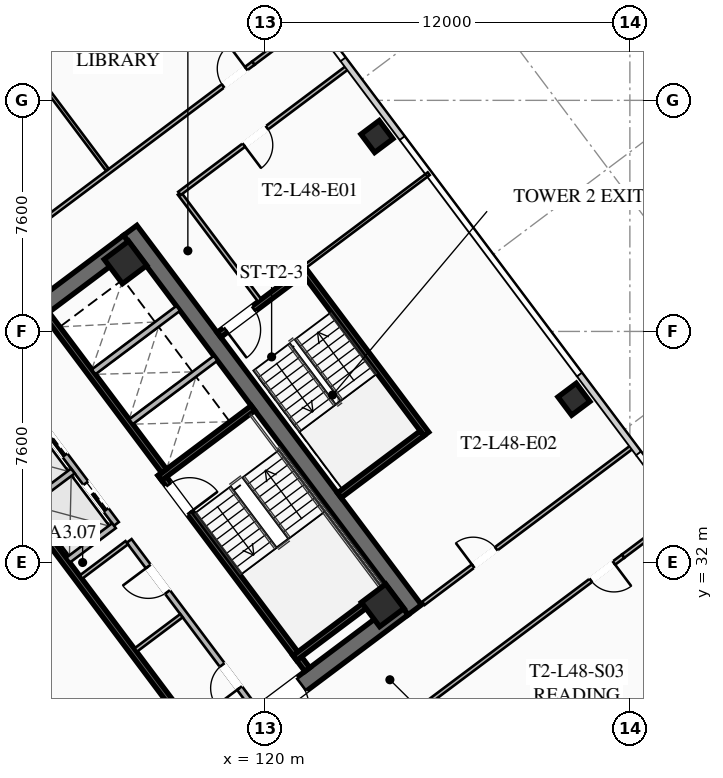
"""IFC4 building model, lengths in metres.
Left out: names, types, materials, properties, quantities, classifications, styles, units other than length and angle.
Written with IfcOpenShell. Run it as: python <this file> out.ifc"""

import sys

from ifc_helpers import new_model, si_unit, direction, frame, frame_2d, origin, origin_2d, place, context, subcontext, project, spatial, rectangle, hollow_rectangle, extrude, element, fill, save


model = new_model("IFC4")
c1 = context("Model", 3, precision=1e-05, world=origin(), true_north=direction((0.0, 1.0)))
c2 = subcontext(c1, "Body", "Model", "MODEL_VIEW")
j1 = project(units=[si_unit("LENGTHUNIT", "METRE"), si_unit("PLANEANGLEUNIT", "RADIAN")], contexts=[c1])
p1 = place(None, origin())
s1 = spatial("IfcSite", under=j1, at=p1, CompositionType="ELEMENT")
p2 = place(p1, origin())
s2 = spatial("IfcBuilding", under=s1, at=p2, CompositionType="ELEMENT")
p3 = place(p2, frame((0.0, 0.0, 178.3)))
s3 = spatial("IfcBuildingStorey", under=s2, at=p3, CompositionType="ELEMENT", Elevation=178.3)
p4 = place(p3, frame((115.564, 42.923, 0.0), z_axis=(0.0, 0.0, 1.0), x_axis=(0.600005007985, -0.799996243986, 0.0)))
e1 = element("IfcWall", 1, at=p4, inside=s3, PredefinedType="SHEAR", context=c2, shape_type="SweptSolid", body=[
    extrude(rectangle(XDim=15.6, YDim=0.55, at=frame_2d((7.8, 0.0))), origin(), (0.0, 0.0, 1.0), 3.55),
])
p5 = place(p3, frame((124.539, 30.498, 0.0), z_axis=(0.0, 0.0, 1.0), x_axis=(-0.799998054672, -0.600002593761, 0.0)))
e2 = element("IfcWall", 2, at=p5, inside=s3, PredefinedType="SHEAR", context=c2, shape_type="SweptSolid", body=[
    extrude(rectangle(XDim=15.06, YDim=0.55, at=frame_2d((7.53, 0.0))), origin(), (0.0, 0.0, 1.0), 3.55),
])
p6 = place(p5, frame((9.23, 0.0, 0.0)))
e3 = element("IfcOpeningElement", 3, at=p6, cuts=e2, PredefinedType="OPENING", context=c2, shape_type="SweptSolid", body=[
    extrude(rectangle(XDim=1.25, YDim=2.25, at=frame_2d((0.625, 1.125))), frame((0.0, 0.285, 0.0), z_axis=(0.0, -1.0, 0.0), x_axis=(1.0, 0.0, 0.0)), (0.0, 0.0, 1.0), 0.57),
])
p7 = place(p5, frame((4.18, 0.0, 0.0)))
e4 = element("IfcOpeningElement", 4, at=p7, cuts=e2, PredefinedType="OPENING", context=c2, shape_type="SweptSolid", body=[
    extrude(rectangle(XDim=1.25, YDim=2.25, at=frame_2d((0.625, 1.125))), frame((0.0, 0.285, 0.0), z_axis=(0.0, -1.0, 0.0), x_axis=(1.0, 0.0, 0.0)), (0.0, 0.0, 1.0), 0.57),
])
p8 = place(p3, frame((103.461, 33.502, 0.0), z_axis=(0.0, 0.0, 1.0), x_axis=(0.799998054672, 0.600002593761, 0.0)))
e5 = element("IfcWall", 5, at=p8, inside=s3, PredefinedType="SHEAR", context=c2, shape_type="SweptSolid", body=[
    extrude(rectangle(XDim=15.06, YDim=0.55, at=frame_2d((7.53, 0.0))), origin(), (0.0, 0.0, 1.0), 3.55),
])
p9 = place(p8, frame((4.58, 0.0, 0.0)))
e6 = element("IfcOpeningElement", 6, at=p9, cuts=e5, PredefinedType="OPENING", context=c2, shape_type="SweptSolid", body=[
    extrude(rectangle(XDim=1.25, YDim=2.25, at=frame_2d((0.625, 1.125))), frame((0.0, 0.285, 0.0), z_axis=(0.0, -1.0, 0.0), x_axis=(1.0, 0.0, 0.0)), (0.0, 0.0, 1.0), 0.57),
])
p10 = place(p8, frame((9.63, 0.0, 0.0)))
e7 = element("IfcOpeningElement", 7, at=p10, cuts=e5, PredefinedType="OPENING", context=c2, shape_type="SweptSolid", body=[
    extrude(rectangle(XDim=1.25, YDim=2.25, at=frame_2d((0.625, 1.125))), frame((0.0, 0.285, 0.0), z_axis=(0.0, -1.0, 0.0), x_axis=(1.0, 0.0, 0.0)), (0.0, 0.0, 1.0), 0.57),
])
for number, where, z_axis, x_axis in (
    (8, (123.87, 30.59, 0.0), (0.0, 0.0, 1.0), (0.8, 0.6, 0.0)),
    (9, (115.41, 41.87, 0.0), (0.0, 0.0, 1.0), (0.8, 0.6, 0.0)),
):
    element("IfcColumn", number, at=place(p3, frame(where, z_axis=z_axis, x_axis=x_axis)), inside=s3, PredefinedType="COLUMN", context=c2, shape_type="SweptSolid", body=[
        extrude(hollow_rectangle(XDim=1.0, YDim=1.0, WallThickness=0.04, at=origin_2d()), origin(), (0.0, 0.0, 1.0), 3.37),
    ])
for number, where, z_axis, x_axis in (
    (10, (130.16, 37.37, 0.0), (0.0, 0.0, 1.0), (0.8, 0.6, 0.0)),
    (11, (123.68, 46.01, 0.0), (0.0, 0.0, 1.0), (0.8, 0.6, 0.0)),
):
    element("IfcColumn", number, at=place(p3, frame(where, z_axis=z_axis, x_axis=x_axis)), inside=s3, PredefinedType="COLUMN", context=c2, shape_type="SweptSolid", body=[
        extrude(hollow_rectangle(XDim=0.75, YDim=0.75, WallThickness=0.032, at=origin_2d()), origin(), (0.0, 0.0, 1.0), 3.37),
    ])
p11 = place(p3, frame((116.56, 34.92, 0.0), z_axis=(0.0, 0.0, 1.0), x_axis=(0.59999029481, -0.8000072788, 0.0)))
e12 = element("IfcWall", 12, at=p11, inside=s3, PredefinedType="SHEAR", context=c2, shape_type="SweptSolid", body=[
    extrude(rectangle(XDim=8.05, YDim=0.2, at=frame_2d((4.025, 0.0))), origin(), (0.0, 0.0, 1.0), 3.37),
])
p12 = place(p11, frame((0.45, 0.0, 0.0)))
e13 = element("IfcOpeningElement", 13, at=p12, cuts=e12, PredefinedType="OPENING", context=c2, shape_type="SweptSolid", body=[
    extrude(rectangle(XDim=1.15, YDim=2.2, at=frame_2d((0.575, 1.1))), frame((0.0, 0.11, 0.0), z_axis=(0.0, -1.0, 0.0), x_axis=(1.0, 0.0, 0.0)), (0.0, 0.0, 1.0), 0.22),
])
for number, where, z_axis, x_axis in (
    (14, (116.54, 34.78, 0.0), (0.0, 0.0, 1.0), (0.8, 0.6, 0.0)),
    (15, (120.98, 28.86, 0.0), (0.0, 0.0, 1.0), (0.8, 0.6, 0.0)),
):
    element("IfcWall", number, at=place(p3, frame(where, z_axis=z_axis, x_axis=x_axis)), inside=s3, PredefinedType="SHEAR", context=c2, shape_type="SweptSolid", body=[
        extrude(rectangle(XDim=3.83, YDim=0.2, at=frame_2d((1.915, 0.0))), origin(), (0.0, 0.0, 1.0), 3.37),
    ])
p13 = place(p3, frame((117.998, 25.936, 0.0), z_axis=(0.0, 0.0, 1.0), x_axis=(-0.600002693989, 0.799997979501, 0.0)))
e16 = element("IfcWall", 16, at=p13, inside=s3, PredefinedType="SHEAR", context=c2, shape_type="SweptSolid", body=[
    extrude(rectangle(XDim=14.5, YDim=0.2, at=frame_2d((7.25, 0.0))), origin(), (0.0, 0.0, 1.0), 3.37),
])
p14 = place(p3, frame((115.19, 23.83, 0.0), z_axis=(0.0, 0.0, 1.0), x_axis=(-0.599993943644, 0.800004542231, 0.0)))
e17 = element("IfcWall", 17, at=p14, inside=s3, PredefinedType="SHEAR", context=c2, shape_type="SweptSolid", body=[
    extrude(rectangle(XDim=6.45, YDim=0.2, at=frame_2d((3.225, 0.0))), origin(), (0.0, 0.0, 1.0), 3.37),
])
p15 = place(p14, frame((4.875, 0.0, 0.0)))
e18 = element("IfcOpeningElement", 18, at=p15, cuts=e17, PredefinedType="OPENING", context=c2, shape_type="SweptSolid", body=[
    extrude(rectangle(XDim=1.3, YDim=2.25, at=frame_2d((0.65, 1.125))), frame((0.0, 0.11, 0.0), z_axis=(0.0, -1.0, 0.0), x_axis=(1.0, 0.0, 0.0)), (0.0, 0.0, 1.0), 0.22),
])
p16 = place(p14, frame((2.875, 0.0, 0.0)))
e19 = element("IfcOpeningElement", 19, at=p16, cuts=e17, PredefinedType="OPENING", context=c2, shape_type="SweptSolid", body=[
    extrude(rectangle(XDim=1.3, YDim=2.25, at=frame_2d((0.65, 1.125))), frame((0.0, 0.11, 0.0), z_axis=(0.0, -1.0, 0.0), x_axis=(1.0, 0.0, 0.0)), (0.0, 0.0, 1.0), 0.22),
])
p17 = place(p14, frame((0.675, 0.0, 0.0)))
e20 = element("IfcOpeningElement", 20, at=p17, cuts=e17, PredefinedType="OPENING", context=c2, shape_type="SweptSolid", body=[
    extrude(rectangle(XDim=1.3, YDim=2.25, at=frame_2d((0.65, 1.125))), frame((0.0, 0.11, 0.0), z_axis=(0.0, -1.0, 0.0), x_axis=(1.0, 0.0, 0.0)), (0.0, 0.0, 1.0), 0.22),
])
p18 = place(p3, frame((112.81, 40.17, 0.0), z_axis=(0.0, 0.0, 1.0), x_axis=(0.599993943644, -0.800004542231, 0.0)))
e21 = element("IfcWall", 21, at=p18, inside=s3, PredefinedType="SHEAR", context=c2, shape_type="SweptSolid", body=[
    extrude(rectangle(XDim=6.45, YDim=0.2, at=frame_2d((3.225, 0.0))), origin(), (0.0, 0.0, 1.0), 3.37),
])
for number, where, z_axis, x_axis in (
    (22, (115.59, 36.63, 0.0), (0.0, 0.0, 1.0), (0.8, 0.6, 0.0)),
    (23, (114.36, 38.27, 0.0), (0.0, 0.0, 1.0), (0.8, 0.6, 0.0)),
):
    element("IfcWall", number, at=place(p3, frame(where, z_axis=z_axis, x_axis=x_axis)), inside=s3, PredefinedType="SOLIDWALL", context=c2, shape_type="SweptSolid", body=[
        extrude(rectangle(XDim=3.48, YDim=0.2, at=frame_2d((1.74, 0.0))), origin(), (0.0, 0.0, 1.0), 3.37),
    ])
p19 = place(p3, frame((119.67, 27.19, 0.0), z_axis=(0.0, 0.0, 1.0), x_axis=(-0.599988677396, 0.800008491828, 0.0)))
e24 = element("IfcWall", 24, at=p19, inside=s3, PredefinedType="SOLIDWALL", context=c2, shape_type="SweptSolid", body=[
    extrude(rectangle(XDim=6.9, YDim=0.2, at=frame_2d((3.45, 0.0))), origin(), (0.0, 0.0, 1.0), 2.723),
])
p20 = place(p19, frame((0.85, 0.0, 0.0)))
e25 = element("IfcOpeningElement", 25, at=p20, cuts=e24, PredefinedType="OPENING", context=c2, shape_type="SweptSolid", body=[
    extrude(rectangle(XDim=0.95, YDim=2.05, at=frame_2d((0.475, 1.025))), frame((0.0, 0.11, 0.0), z_axis=(0.0, -1.0, 0.0), x_axis=(1.0, 0.0, 0.0)), (0.0, 0.0, 1.0), 0.22),
])
p21 = place(p19, frame((4.8, 0.0, 0.0)))
e26 = element("IfcOpeningElement", 26, at=p21, cuts=e24, PredefinedType="OPENING", context=c2, shape_type="SweptSolid", body=[
    extrude(rectangle(XDim=1.05, YDim=2.2, at=frame_2d((0.525, 1.1))), frame((0.0, 0.11, 0.0), z_axis=(0.0, -1.0, 0.0), x_axis=(1.0, 0.0, 0.0)), (0.0, 0.0, 1.0), 0.22),
])
for number, where, z_axis, x_axis in (
    (27, (113.946, 31.522, 0.0), (0.0, 0.0, 1.0), (0.8, 0.6, 0.0)),
    (28, (115.746, 29.122, 0.0), (0.0, 0.0, 1.0), (0.8, 0.6, 0.0)),
):
    element("IfcWall", number, at=place(p3, frame(where, z_axis=z_axis, x_axis=x_axis)), inside=s3, PredefinedType="PARTITIONING", context=c2, shape_type="SweptSolid", body=[
        extrude(rectangle(XDim=1.88, YDim=0.135, at=frame_2d((0.94, 0.0))), origin(), (0.0, 0.0, 1.0), 2.723),
    ])
p22 = place(p3, frame((115.11, 33.27, 0.0), z_axis=(0.0, 0.0, 1.0), x_axis=(-0.600011322243, 0.799991508192, 0.0)))
e29 = element("IfcWall", 29, at=p22, inside=s3, PredefinedType="SOLIDWALL", context=c2, shape_type="SweptSolid", body=[
    extrude(rectangle(XDim=6.9, YDim=0.2, at=frame_2d((3.45, 0.0))), origin(), (0.0, 0.0, 1.0), 3.37),
])
p23 = place(p22, frame((0.575, 0.0, 0.0)))
e30 = element("IfcOpeningElement", 30, at=p23, cuts=e29, PredefinedType="OPENING", context=c2, shape_type="SweptSolid", body=[
    extrude(rectangle(XDim=1.1, YDim=2.2, at=frame_2d((0.55, 1.1))), frame((0.0, 0.11, 0.0), z_axis=(0.0, -1.0, 0.0), x_axis=(1.0, 0.0, 0.0)), (0.0, 0.0, 1.0), 0.22),
])
p24 = place(p22, frame((2.825, 0.0, 0.0)))
e31 = element("IfcOpeningElement", 31, at=p24, cuts=e29, PredefinedType="OPENING", context=c2, shape_type="SweptSolid", body=[
    extrude(rectangle(XDim=1.1, YDim=2.2, at=frame_2d((0.55, 1.1))), frame((0.0, 0.11, 0.0), z_axis=(0.0, -1.0, 0.0), x_axis=(1.0, 0.0, 0.0)), (0.0, 0.0, 1.0), 0.22),
])
p25 = place(p22, frame((5.075, 0.0, 0.0)))
e32 = element("IfcOpeningElement", 32, at=p25, cuts=e29, PredefinedType="OPENING", context=c2, shape_type="SweptSolid", body=[
    extrude(rectangle(XDim=1.1, YDim=2.2, at=frame_2d((0.55, 1.1))), frame((0.0, 0.11, 0.0), z_axis=(0.0, -1.0, 0.0), x_axis=(1.0, 0.0, 0.0)), (0.0, 0.0, 1.0), 0.22),
])
p26 = place(p3, frame((113.526, 32.082, 0.0), z_axis=(0.0, 0.0, 1.0), x_axis=(0.800046745961, 0.599937666993, 0.0)))
e33 = element("IfcWall", 33, at=p26, inside=s3, PredefinedType="SOLIDWALL", context=c2, shape_type="SweptSolid", body=[
    extrude(rectangle(XDim=1.88, YDim=0.2, at=frame_2d((0.94, 0.0))), origin(), (0.0, 0.0, 1.0), 3.37),
])
p27 = place(p3, frame((112.176, 33.882, 0.0), z_axis=(0.0, 0.0, 1.0), x_axis=(0.8, 0.6, 0.0)))
e34 = element("IfcWall", 34, at=p27, inside=s3, PredefinedType="SOLIDWALL", context=c2, shape_type="SweptSolid", body=[
    extrude(rectangle(XDim=1.88, YDim=0.2, at=frame_2d((0.94, 0.0))), origin(), (0.0, 0.0, 1.0), 3.37),
])
p28 = place(p3, frame((125.304, 36.228, 0.0), z_axis=(0.0, 0.0, 1.0), x_axis=(-0.59998851072, 0.800008616831, 0.0)))
e35 = element("IfcWall", 35, at=p28, inside=s3, PredefinedType="SHEAR", context=c2, shape_type="SweptSolid", body=[
    extrude(rectangle(XDim=6.8, YDim=0.2, at=frame_2d((3.4, 0.0))), origin(), (0.0, 0.0, 1.0), 3.37),
])
p29 = place(p3, frame((121.204, 41.528, 0.0), z_axis=(0.0, 0.0, 1.0), x_axis=(-0.800017232136, -0.599977023131, 0.0)))
e36 = element("IfcWall", 36, at=p29, inside=s3, PredefinedType="SHEAR", context=c2, shape_type="SweptSolid", body=[
    extrude(rectangle(XDim=3.4, YDim=0.2, at=frame_2d((1.7, 0.0))), origin(), (0.0, 0.0, 1.0), 3.37),
])
p30 = place(p29, frame((1.975, 0.0, 0.0)))
e37 = element("IfcOpeningElement", 37, at=p30, cuts=e36, PredefinedType="OPENING", context=c2, shape_type="SweptSolid", body=[
    extrude(rectangle(XDim=1.15, YDim=2.2, at=frame_2d((0.575, 1.1))), frame((0.0, 0.11, 0.0), z_axis=(0.0, -1.0, 0.0), x_axis=(1.0, 0.0, 0.0)), (0.0, 0.0, 1.0), 0.22),
])
p31 = place(p3, frame((122.444, 34.208, 0.0), z_axis=(0.0, 0.0, 1.0), x_axis=(0.79999138319, 0.600011488909, 0.0)))
e38 = element("IfcWall", 38, at=p31, inside=s3, PredefinedType="SHEAR", context=c2, shape_type="SweptSolid", body=[
    extrude(rectangle(XDim=3.4, YDim=0.2, at=frame_2d((1.7, 0.0))), origin(), (0.0, 0.0, 1.0), 3.37),
])
p32 = place(p3, frame((119.824, 40.618, 0.0), z_axis=(0.0, 0.0, 1.0), x_axis=(-0.599982243973, 0.800013316712, 0.0)))
e39 = element("IfcWall", 39, at=p32, inside=s3, PredefinedType="PARTITIONING", context=c2, shape_type="SweptSolid", body=[
    extrude(rectangle(XDim=4.4, YDim=0.135, at=frame_2d((2.2, 0.0))), origin(), (0.0, 0.0, 1.0), 2.723),
])
p33 = place(p3, frame((96.658, 31.206, 0.0), z_axis=(0.0, 0.0, 1.0), x_axis=(0.8, 0.6, 0.0)))
e40 = element("IfcWall", 40, at=p33, inside=s3, PredefinedType="PARTITIONING", context=c2, shape_type="SweptSolid", body=[
    extrude(rectangle(XDim=28.7, YDim=0.135, at=frame_2d((14.35, 0.0))), origin(), (0.0, 0.0, 1.0), 2.723),
])
p34 = place(p33, frame((0.3, 0.0, 0.0)))
e41 = element("IfcOpeningElement", 41, at=p34, cuts=e40, PredefinedType="OPENING", context=c2, shape_type="SweptSolid", body=[
    extrude(rectangle(XDim=0.95, YDim=2.05, at=frame_2d((0.475, 1.025))), frame((0.0, 0.077, 0.0), z_axis=(0.0, -1.0, 0.0), x_axis=(1.0, 0.0, 0.0)), (0.0, 0.0, 1.0), 0.155),
])
p35 = place(p33, frame((9.959, 0.0, 0.0)))
e42 = element("IfcOpeningElement", 42, at=p35, cuts=e40, PredefinedType="OPENING", context=c2, shape_type="SweptSolid", body=[
    extrude(rectangle(XDim=0.95, YDim=2.05, at=frame_2d((0.475, 1.025))), frame((0.0, 0.077, 0.0), z_axis=(0.0, -1.0, 0.0), x_axis=(1.0, 0.0, 0.0)), (0.0, 0.0, 1.0), 0.155),
])
p36 = place(p33, frame((14.005, 0.0, 0.0)))
e43 = element("IfcOpeningElement", 43, at=p36, cuts=e40, PredefinedType="OPENING", context=c2, shape_type="SweptSolid", body=[
    extrude(rectangle(XDim=0.95, YDim=2.05, at=frame_2d((0.475, 1.025))), frame((0.0, 0.077, 0.0), z_axis=(0.0, -1.0, 0.0), x_axis=(1.0, 0.0, 0.0)), (0.0, 0.0, 1.0), 0.155),
])
p37 = place(p33, frame((18.049, 0.0, 0.0)))
e44 = element("IfcOpeningElement", 44, at=p37, cuts=e40, PredefinedType="OPENING", context=c2, shape_type="SweptSolid", body=[
    extrude(rectangle(XDim=0.95, YDim=2.05, at=frame_2d((0.475, 1.025))), frame((0.0, 0.077, 0.0), z_axis=(0.0, -1.0, 0.0), x_axis=(1.0, 0.0, 0.0)), (0.0, 0.0, 1.0), 0.155),
])
p38 = place(p33, frame((27.45, 0.0, 0.0)))
e45 = element("IfcOpeningElement", 45, at=p38, cuts=e40, PredefinedType="OPENING", context=c2, shape_type="SweptSolid", body=[
    extrude(rectangle(XDim=0.95, YDim=2.05, at=frame_2d((0.475, 1.025))), frame((0.0, 0.077, 0.0), z_axis=(0.0, -1.0, 0.0), x_axis=(1.0, 0.0, 0.0)), (0.0, 0.0, 1.0), 0.155),
])
p39 = place(p3, frame((119.618, 48.426, 0.0), z_axis=(0.0, 0.0, 1.0), x_axis=(0.800012055778, 0.599983925293, 0.0)))
e46 = element("IfcWall", 46, at=p39, inside=s3, PredefinedType="PARTITIONING", context=c2, shape_type="SweptSolid", body=[
    extrude(rectangle(XDim=2.43, YDim=0.135, at=frame_2d((1.215, 0.0))), origin(), (0.0, 0.0, 1.0), 2.723),
])
p40 = place(p3, frame((114.81, 44.92, 0.0), z_axis=(0.0, 0.0, 1.0), x_axis=(-0.600005761307, 0.799995678987, 0.0)))
e47 = element("IfcWall", 47, at=p40, inside=s3, PredefinedType="PARTITIONING", context=c2, shape_type="SweptSolid", body=[
    extrude(rectangle(XDim=6.78, YDim=0.11, at=frame_2d((3.39, 0.0))), origin(), (0.0, 0.0, 1.0), 2.723),
])
p41 = place(p3, frame((131.78, 32.21, 0.0), z_axis=(0.0, 0.0, 1.0), x_axis=(-0.8, -0.6, 0.0)))
e48 = element("IfcWall", 48, at=p41, inside=s3, PredefinedType="PARTITIONING", context=c2, shape_type="SweptSolid", body=[
    extrude(rectangle(XDim=28.7, YDim=0.135, at=frame_2d((14.35, 0.0))), origin(), (0.0, 0.0, 1.0), 2.723),
])
p42 = place(p41, frame((27.37, 0.0, 0.0)))
e49 = element("IfcOpeningElement", 49, at=p42, cuts=e48, PredefinedType="OPENING", context=c2, shape_type="SweptSolid", body=[
    extrude(rectangle(XDim=0.95, YDim=2.05, at=frame_2d((0.475, 1.025))), frame((0.0, 0.077, 0.0), z_axis=(0.0, -1.0, 0.0), x_axis=(1.0, 0.0, 0.0)), (0.0, 0.0, 1.0), 0.155),
])
p43 = place(p41, frame((13.592, 0.0, 0.0)))
e50 = element("IfcOpeningElement", 50, at=p43, cuts=e48, PredefinedType="OPENING", context=c2, shape_type="SweptSolid", body=[
    extrude(rectangle(XDim=0.95, YDim=2.05, at=frame_2d((0.475, 1.025))), frame((0.0, 0.077, 0.0), z_axis=(0.0, -1.0, 0.0), x_axis=(1.0, 0.0, 0.0)), (0.0, 0.0, 1.0), 0.155),
])
p44 = place(p41, frame((0.38, 0.0, 0.0)))
e51 = element("IfcOpeningElement", 51, at=p44, cuts=e48, PredefinedType="OPENING", context=c2, shape_type="SweptSolid", body=[
    extrude(rectangle(XDim=0.95, YDim=2.05, at=frame_2d((0.475, 1.025))), frame((0.0, 0.077, 0.0), z_axis=(0.0, -1.0, 0.0), x_axis=(1.0, 0.0, 0.0)), (0.0, 0.0, 1.0), 0.155),
])
p45 = place(p3, frame((131.78, 32.21, 0.0), z_axis=(0.0, 0.0, 1.0), x_axis=(0.800012055778, 0.599983925293, 0.0)))
e52 = element("IfcWall", 52, at=p45, inside=s3, PredefinedType="PARTITIONING", context=c2, shape_type="SweptSolid", body=[
    extrude(rectangle(XDim=2.43, YDim=0.135, at=frame_2d((1.215, 0.0))), origin(), (0.0, 0.0, 1.0), 2.723),
])
p46 = place(p3, frame((122.744, 48.308, 0.0), z_axis=(0.0, 0.0, 1.0), x_axis=(-0.79997892247, -0.600028102345, 0.0)))
e53 = element("IfcWall", 53, at=p46, inside=s3, PredefinedType="PARTITIONING", context=c2, shape_type="SweptSolid", body=[
    extrude(rectangle(XDim=6.95, YDim=0.135, at=frame_2d((3.475, 0.0))), origin(), (0.0, 0.0, 1.0), 2.723),
])
p47 = place(p46, frame((3.35, 0.0, 0.0)))
e54 = element("IfcOpeningElement", 54, at=p47, cuts=e53, PredefinedType="OPENING", context=c2, shape_type="SweptSolid", body=[
    extrude(rectangle(XDim=0.95, YDim=2.05, at=frame_2d((0.475, 1.025))), frame((0.0, 0.077, 0.0), z_axis=(0.0, -1.0, 0.0), x_axis=(1.0, 0.0, 0.0)), (0.0, 0.0, 1.0), 0.155),
])
p48 = place(p3, frame((125.208, 30.656, 0.0), z_axis=(0.0, 0.0, 1.0), x_axis=(0.800006797429, 0.599990936654, 0.0)))
e55 = element("IfcWall", 55, at=p48, inside=s3, PredefinedType="PARTITIONING", context=c2, shape_type="SweptSolid", body=[
    extrude(rectangle(XDim=8.62, YDim=0.135, at=frame_2d((4.31, 0.0))), origin(), (0.0, 0.0, 1.0), 2.723),
])
p49 = place(p48, frame((2.045, 0.0, 0.0)))
e56 = element("IfcOpeningElement", 56, at=p49, cuts=e55, PredefinedType="OPENING", context=c2, shape_type="SweptSolid", body=[
    extrude(rectangle(XDim=0.95, YDim=2.05, at=frame_2d((0.475, 1.025))), frame((0.0, 0.077, 0.0), z_axis=(0.0, -1.0, 0.0), x_axis=(1.0, 0.0, 0.0)), (0.0, 0.0, 1.0), 0.155),
])
p50 = place(p3, frame((125.384, 44.788, 0.0), z_axis=(0.0, 0.0, 1.0), x_axis=(-0.8, -0.6, 0.0)))
e57 = element("IfcWall", 57, at=p50, inside=s3, PredefinedType="PARTITIONING", context=c2, shape_type="SweptSolid", body=[
    extrude(rectangle(XDim=5.1, YDim=0.11, at=frame_2d((2.55, 0.0))), origin(), (0.0, 0.0, 1.0), 2.723),
])
p51 = place(p7, origin())
e58 = element("IfcDoor", 58, at=p51, inside=s3, OperationType="SINGLE_SWING_RIGHT", PredefinedType="DOOR", context=c2, shape_type="SweptSolid", body=[
    extrude(rectangle(XDim=1.25, YDim=2.25, at=frame_2d((0.625, 1.125))), frame((0.0, 0.025, 0.0), z_axis=(0.0, -1.0, 0.0), x_axis=(1.0, 0.0, 0.0)), (0.0, 0.0, 1.0), 0.05),
])
fill(e4, e58)
p52 = place(p12, origin())
e59 = element("IfcDoor", 59, at=p52, inside=s3, OperationType="SINGLE_SWING_RIGHT", PredefinedType="DOOR", context=c2, shape_type="SweptSolid", body=[
    extrude(rectangle(XDim=1.15, YDim=2.2, at=frame_2d((0.575, 1.1))), frame((0.0, 0.025, 0.0), z_axis=(0.0, -1.0, 0.0), x_axis=(1.0, 0.0, 0.0)), (0.0, 0.0, 1.0), 0.05),
])
fill(e13, e59)
p53 = place(p20, origin())
e60 = element("IfcDoor", 60, at=p53, inside=s3, OperationType="SINGLE_SWING_LEFT", PredefinedType="DOOR", context=c2, shape_type="SweptSolid", body=[
    extrude(rectangle(XDim=0.95, YDim=2.05, at=frame_2d((0.475, 1.025))), frame((0.0, 0.025, 0.0), z_axis=(0.0, -1.0, 0.0), x_axis=(1.0, 0.0, 0.0)), (0.0, 0.0, 1.0), 0.05),
])
fill(e25, e60)
p54 = place(p21, origin())
e61 = element("IfcDoor", 61, at=p54, inside=s3, OperationType="SINGLE_SWING_RIGHT", PredefinedType="DOOR", context=c2, shape_type="SweptSolid", body=[
    extrude(rectangle(XDim=1.05, YDim=2.2, at=frame_2d((0.525, 1.1))), frame((0.0, 0.025, 0.0), z_axis=(0.0, -1.0, 0.0), x_axis=(1.0, 0.0, 0.0)), (0.0, 0.0, 1.0), 0.05),
])
fill(e26, e61)
p55 = place(p30, origin())
e62 = element("IfcDoor", 62, at=p55, inside=s3, OperationType="SINGLE_SWING_RIGHT", PredefinedType="DOOR", context=c2, shape_type="SweptSolid", body=[
    extrude(rectangle(XDim=1.15, YDim=2.2, at=frame_2d((0.575, 1.1))), frame((0.0, 0.025, 0.0), z_axis=(0.0, -1.0, 0.0), x_axis=(1.0, 0.0, 0.0)), (0.0, 0.0, 1.0), 0.05),
])
fill(e37, e62)
p56 = place(p38, origin())
e63 = element("IfcDoor", 63, at=p56, inside=s3, OperationType="SINGLE_SWING_RIGHT", PredefinedType="DOOR", context=c2, shape_type="SweptSolid", body=[
    extrude(rectangle(XDim=0.95, YDim=2.05, at=frame_2d((0.475, 1.025))), frame((0.0, 0.025, 0.0), z_axis=(0.0, -1.0, 0.0), x_axis=(1.0, 0.0, 0.0)), (0.0, 0.0, 1.0), 0.05),
])
fill(e45, e63)
p57 = place(p44, origin())
e64 = element("IfcDoor", 64, at=p57, inside=s3, OperationType="SINGLE_SWING_LEFT", PredefinedType="DOOR", context=c2, shape_type="SweptSolid", body=[
    extrude(rectangle(XDim=0.95, YDim=2.05, at=frame_2d((0.475, 1.025))), frame((0.0, 0.025, 0.0), z_axis=(0.0, -1.0, 0.0), x_axis=(1.0, 0.0, 0.0)), (0.0, 0.0, 1.0), 0.05),
])
fill(e51, e64)
p58 = place(p47, origin())
e65 = element("IfcDoor", 65, at=p58, inside=s3, OperationType="SINGLE_SWING_RIGHT", PredefinedType="DOOR", context=c2, shape_type="SweptSolid", body=[
    extrude(rectangle(XDim=0.95, YDim=2.05, at=frame_2d((0.475, 1.025))), frame((0.0, 0.025, 0.0), z_axis=(0.0, -1.0, 0.0), x_axis=(1.0, 0.0, 0.0)), (0.0, 0.0, 1.0), 0.05),
])
fill(e54, e65)
p59 = place(p49, origin())
e66 = element("IfcDoor", 66, at=p59, inside=s3, OperationType="SINGLE_SWING_LEFT", PredefinedType="DOOR", context=c2, shape_type="SweptSolid", body=[
    extrude(rectangle(XDim=0.95, YDim=2.05, at=frame_2d((0.475, 1.025))), frame((0.0, 0.025, 0.0), z_axis=(0.0, -1.0, 0.0), x_axis=(1.0, 0.0, 0.0)), (0.0, 0.0, 1.0), 0.05),
])
fill(e56, e66)
p60 = place(p23, origin())
e67 = element("IfcDoor", 67, at=p60, inside=s3, OperationType="SLIDING_TO_LEFT", PredefinedType="DOOR", context=c2, shape_type="SweptSolid", body=[
    extrude(rectangle(XDim=1.1, YDim=2.2, at=frame_2d((0.55, 1.1))), frame((0.0, 0.025, 0.0), z_axis=(0.0, -1.0, 0.0), x_axis=(1.0, 0.0, 0.0)), (0.0, 0.0, 1.0), 0.05),
])
fill(e30, e67)
p61 = place(p24, origin())
e68 = element("IfcDoor", 68, at=p61, inside=s3, OperationType="SLIDING_TO_LEFT", PredefinedType="DOOR", context=c2, shape_type="SweptSolid", body=[
    extrude(rectangle(XDim=1.1, YDim=2.2, at=frame_2d((0.55, 1.1))), frame((0.0, 0.025, 0.0), z_axis=(0.0, -1.0, 0.0), x_axis=(1.0, 0.0, 0.0)), (0.0, 0.0, 1.0), 0.05),
])
fill(e31, e68)
save(model, sys.argv[1])
